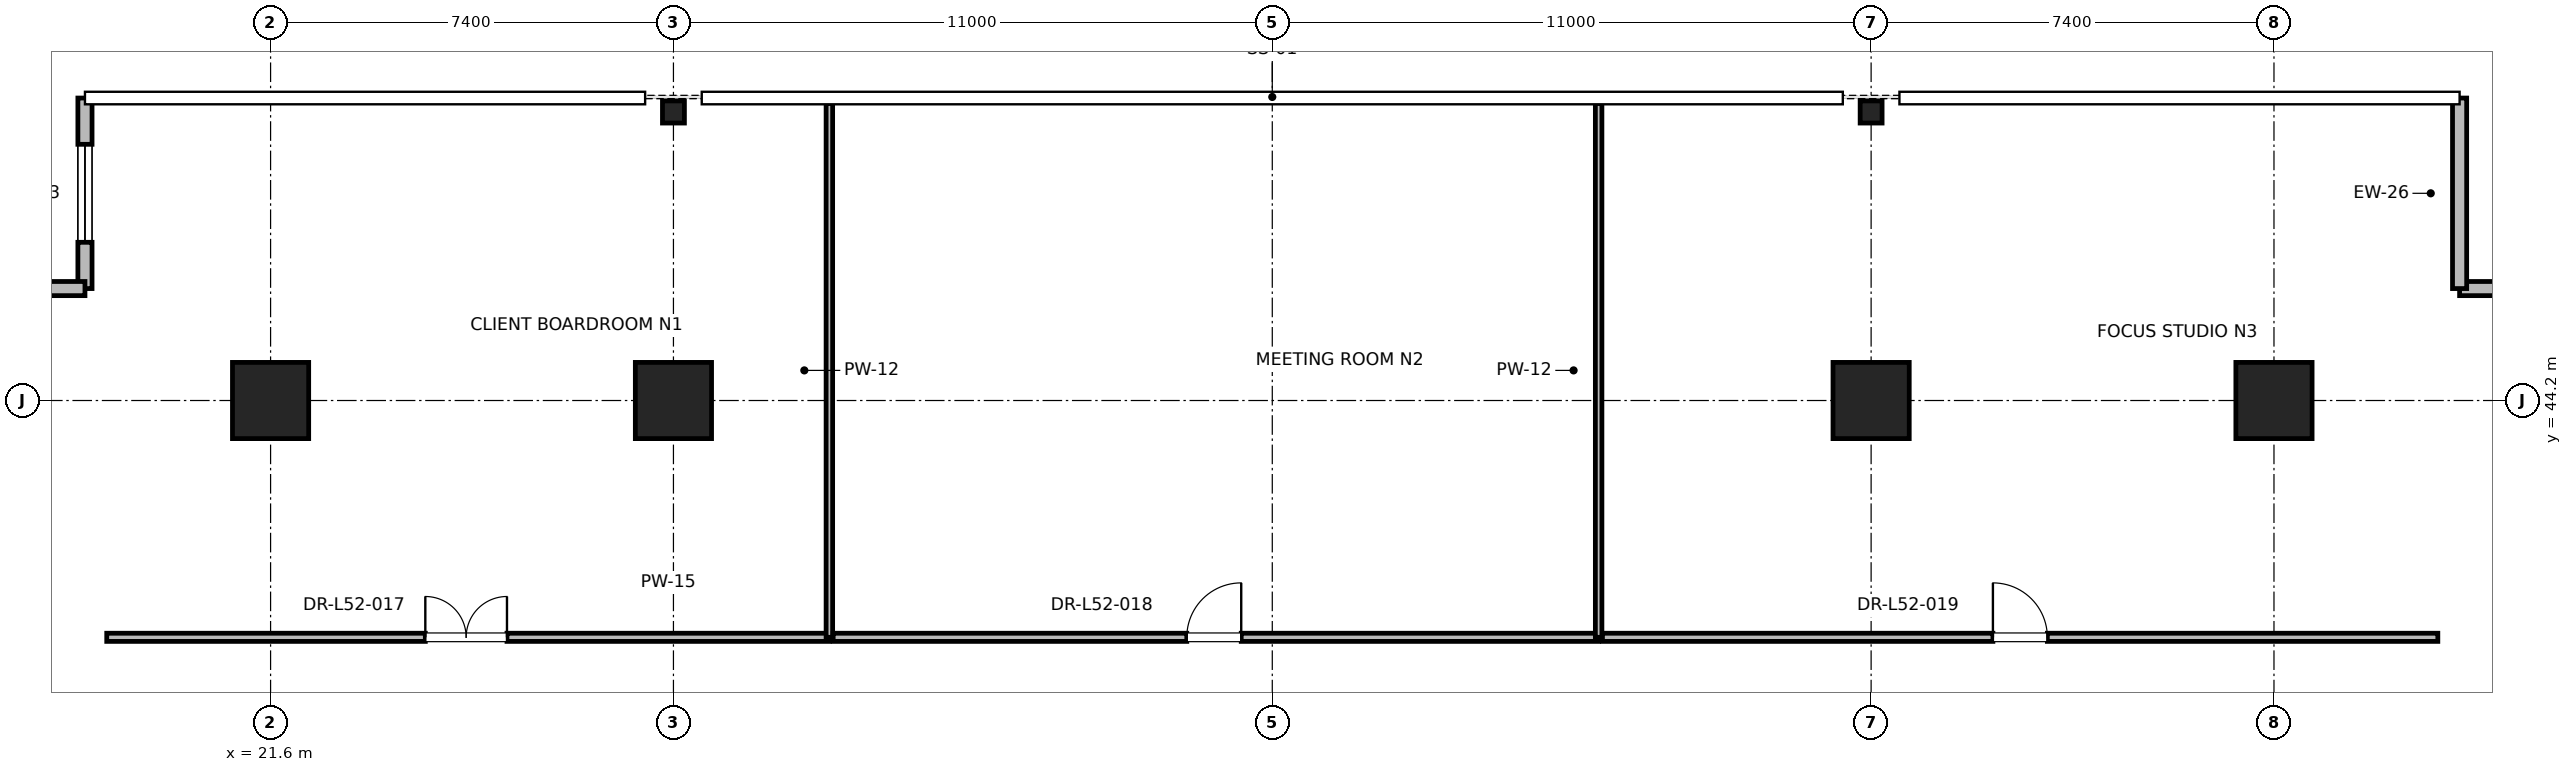
"""IFC4 building model, lengths in metres.
Left out: names, types, materials, properties, quantities, classifications, styles, units other than length and angle.
Written with IfcOpenShell. Run it as: python <this file> out.ifc"""

import sys

from ifc_helpers import new_model, si_unit, direction, frame, frame_2d, origin, origin_2d, place, context, subcontext, project, spatial, rectangle, i_section, extrude, element, fill, save


model = new_model("IFC4")
c1 = context("Model", 3, precision=1e-05, world=origin(), true_north=direction((0.0, 1.0)))
c2 = subcontext(c1, "Body", "Model", "MODEL_VIEW")
j1 = project(units=[si_unit("LENGTHUNIT", "METRE"), si_unit("PLANEANGLEUNIT", "RADIAN")], contexts=[c1])
p1 = place(None, origin())
s1 = spatial("IfcSite", under=j1, at=p1, CompositionType="ELEMENT")
p2 = place(p1, origin())
s2 = spatial("IfcBuilding", under=s1, at=p2, CompositionType="ELEMENT")
p3 = place(p2, frame((0.0, 0.0, 225.2)))
s3 = spatial("IfcBuildingStorey", under=s2, at=p3, CompositionType="ELEMENT", Elevation=225.2)
for number, where, z_axis, x_axis in (
    (1, (29.0, 44.2, 0.0), (0.0, 0.0, 1.0), (1.0, 0.0, 0.0)),
    (2, (51.0, 44.2, 0.0), (0.0, 0.0, 1.0), (1.0, 0.0, 0.0)),
    (3, (21.6, 44.2, 0.0), (0.0, 0.0, 1.0), (1.0, 0.0, 0.0)),
    (4, (58.4, 44.2, 0.0), (0.0, 0.0, 1.0), (1.0, 0.0, 0.0)),
):
    element("IfcColumn", number, at=place(p3, frame(where, z_axis=z_axis, x_axis=x_axis)), inside=s3, PredefinedType="COLUMN", context=c2, shape_type="SweptSolid", body=[
        extrude(rectangle(XDim=1.4, YDim=1.4, at=origin_2d()), origin(), (0.0, 0.0, 1.0), 4.0),
    ])
for number, where, z_axis, x_axis in (
    (5, (29.0, 49.5, 0.0), (0.0, 0.0, 1.0), (1.0, 0.0, 0.0)),
    (6, (51.0, 49.5, 0.0), (0.0, 0.0, 1.0), (1.0, 0.0, 0.0)),
):
    element("IfcColumn", number, at=place(p3, frame(where, z_axis=z_axis, x_axis=x_axis)), inside=s3, PredefinedType="COLUMN", context=c2, shape_type="SweptSolid", body=[
        extrude(i_section(OverallWidth=0.403, OverallDepth=0.406, WebThickness=0.027, FlangeThickness=0.043, FilletRadius=0.015, at=origin_2d()), origin(), (0.0, 0.0, 1.0), 4.0),
    ])
p4 = place(p3, frame((65.81, 46.256, 0.0), z_axis=(0.0, 0.0, 1.0), x_axis=(-1.0, 0.0, 0.0)))
e7 = element("IfcWall", 7, at=p4, inside=s3, PredefinedType="PARAPET", context=c2, shape_type="SweptSolid", body=[
    extrude(rectangle(XDim=4.0, YDim=0.26, at=frame_2d((2.0, 0.0))), origin(), (0.0, 0.0, 1.0), 3.775),
])
p5 = place(p4, frame((1.1, 0.0, 0.85)))
e8 = element("IfcOpeningElement", 8, at=p5, cuts=e7, PredefinedType="OPENING", context=c2, shape_type="SweptSolid", body=[
    extrude(rectangle(XDim=1.8, YDim=2.2, at=frame_2d((0.9, 1.1))), frame((0.0, 0.13, 0.0), z_axis=(0.0, -1.0, 0.0), x_axis=(1.0, 0.0, 0.0)), (0.0, 0.0, 1.0), 0.26),
])
p6 = place(p3, frame((61.81, 46.256, 0.0), z_axis=(0.0, 0.0, 1.0), x_axis=(0.0, 1.0, 0.0)))
e9 = element("IfcWall", 9, at=p6, inside=s3, PredefinedType="PARAPET", context=c2, shape_type="SweptSolid", body=[
    extrude(rectangle(XDim=3.5, YDim=0.26, at=frame_2d((1.75, 0.0))), origin(), (0.0, 0.0, 1.0), 3.775),
])
p7 = place(p3, frame((18.19, 49.756, 0.0), z_axis=(0.0, 0.0, 1.0), x_axis=(0.0, -1.0, 0.0)))
e10 = element("IfcWall", 10, at=p7, inside=s3, PredefinedType="PARAPET", context=c2, shape_type="SweptSolid", body=[
    extrude(rectangle(XDim=3.5, YDim=0.26, at=frame_2d((1.75, 0.0))), origin(), (0.0, 0.0, 1.0), 3.775),
])
p8 = place(p7, frame((0.85, 0.0, 0.85)))
e11 = element("IfcOpeningElement", 11, at=p8, cuts=e10, PredefinedType="OPENING", context=c2, shape_type="SweptSolid", body=[
    extrude(rectangle(XDim=1.8, YDim=2.2, at=frame_2d((0.9, 1.1))), frame((0.0, 0.13, 0.0), z_axis=(0.0, -1.0, 0.0), x_axis=(1.0, 0.0, 0.0)), (0.0, 0.0, 1.0), 0.26),
])
p9 = place(p3, frame((18.19, 46.256, 0.0), z_axis=(0.0, 0.0, 1.0), x_axis=(-1.0, 0.0, 0.0)))
e12 = element("IfcWall", 12, at=p9, inside=s3, PredefinedType="PARAPET", context=c2, shape_type="SweptSolid", body=[
    extrude(rectangle(XDim=4.0, YDim=0.26, at=frame_2d((2.0, 0.0))), origin(), (0.0, 0.0, 1.0), 3.775),
])
p10 = place(p3, frame((18.59, 39.85, 0.0), z_axis=(0.0, 0.0, 1.0), x_axis=(1.0, 0.0, 0.0)))
e13 = element("IfcWall", 13, at=p10, inside=s3, PredefinedType="PARTITIONING", context=c2, shape_type="SweptSolid", body=[
    extrude(rectangle(XDim=13.274, YDim=0.15, at=frame_2d((6.637, 0.0))), origin(), (0.0, 0.0, 1.0), 2.85),
])
p11 = place(p10, frame((5.852, 0.0, 0.0)))
e14 = element("IfcOpeningElement", 14, at=p11, cuts=e13, PredefinedType="OPENING", context=c2, shape_type="SweptSolid", body=[
    extrude(rectangle(XDim=1.5, YDim=2.25, at=frame_2d((0.75, 1.125))), frame((0.0, 0.075, 0.0), z_axis=(0.0, -1.0, 0.0), x_axis=(1.0, 0.0, 0.0)), (0.0, 0.0, 1.0), 0.15),
])
p12 = place(p3, frame((31.864, 39.85, 0.0), z_axis=(0.0, 0.0, 1.0), x_axis=(0.0, 1.0, 0.0)))
e15 = element("IfcWall", 15, at=p12, inside=s3, PredefinedType="PARTITIONING", context=c2, shape_type="SweptSolid", body=[
    extrude(rectangle(XDim=9.806, YDim=0.12, at=frame_2d((4.903, 0.0))), origin(), (0.0, 0.0, 1.0), 2.405),
])
p13 = place(p3, frame((31.934, 39.85, 0.0), z_axis=(0.0, 0.0, 1.0), x_axis=(1.0, 0.0, 0.0)))
e16 = element("IfcWall", 16, at=p13, inside=s3, PredefinedType="PARTITIONING", context=c2, shape_type="SweptSolid", body=[
    extrude(rectangle(XDim=14.06, YDim=0.15, at=frame_2d((7.03, 0.0))), origin(), (0.0, 0.0, 1.0), 2.85),
])
p14 = place(p13, frame((6.495, 0.0, 0.0)))
e17 = element("IfcOpeningElement", 17, at=p14, cuts=e16, PredefinedType="OPENING", context=c2, shape_type="SweptSolid", body=[
    extrude(rectangle(XDim=1.0, YDim=2.15, at=frame_2d((0.5, 1.075))), frame((0.0, 0.075, 0.0), z_axis=(0.0, -1.0, 0.0), x_axis=(1.0, 0.0, 0.0)), (0.0, 0.0, 1.0), 0.15),
])
p15 = place(p3, frame((45.995, 39.85, 0.0), z_axis=(0.0, 0.0, 1.0), x_axis=(0.0, 1.0, 0.0)))
e18 = element("IfcWall", 18, at=p15, inside=s3, PredefinedType="PARTITIONING", context=c2, shape_type="SweptSolid", body=[
    extrude(rectangle(XDim=9.806, YDim=0.12, at=frame_2d((4.903, 0.0))), origin(), (0.0, 0.0, 1.0), 2.405),
])
p16 = place(p3, frame((46.065, 39.85, 0.0), z_axis=(0.0, 0.0, 1.0), x_axis=(1.0, 0.0, 0.0)))
e19 = element("IfcWall", 19, at=p16, inside=s3, PredefinedType="PARTITIONING", context=c2, shape_type="SweptSolid", body=[
    extrude(rectangle(XDim=15.345, YDim=0.15, at=frame_2d((7.672, 0.0))), origin(), (0.0, 0.0, 1.0), 2.85),
])
p17 = place(p16, frame((7.173, 0.0, 0.0)))
e20 = element("IfcOpeningElement", 20, at=p17, cuts=e19, PredefinedType="OPENING", context=c2, shape_type="SweptSolid", body=[
    extrude(rectangle(XDim=1.0, YDim=2.15, at=frame_2d((0.5, 1.075))), frame((0.0, 0.075, 0.0), z_axis=(0.0, -1.0, 0.0), x_axis=(1.0, 0.0, 0.0)), (0.0, 0.0, 1.0), 0.15),
])
p18 = place(p8, origin())
e21 = element("IfcWindow", 21, at=p18, inside=s3, PartitioningType="SINGLE_PANEL", PredefinedType="WINDOW", context=c2, shape_type="SweptSolid", body=[
    extrude(rectangle(XDim=1.8, YDim=2.2, at=frame_2d((0.9, 1.1))), frame((0.0, 0.03, 0.0), z_axis=(0.0, -1.0, 0.0), x_axis=(1.0, 0.0, 0.0)), (0.0, 0.0, 1.0), 0.06),
])
fill(e11, e21)
p19 = place(p11, origin())
e22 = element("IfcDoor", 22, at=p19, inside=s3, OperationType="DOUBLE_DOOR_SINGLE_SWING", PredefinedType="DOOR", context=c2, shape_type="SweptSolid", body=[
    extrude(rectangle(XDim=1.5, YDim=2.25, at=frame_2d((0.75, 1.125))), frame((0.0, 0.025, 0.0), z_axis=(0.0, -1.0, 0.0), x_axis=(1.0, 0.0, 0.0)), (0.0, 0.0, 1.0), 0.05),
])
fill(e14, e22)
p20 = place(p14, origin())
e23 = element("IfcDoor", 23, at=p20, inside=s3, OperationType="SINGLE_SWING_RIGHT", PredefinedType="DOOR", context=c2, shape_type="SweptSolid", body=[
    extrude(rectangle(XDim=1.0, YDim=2.15, at=frame_2d((0.5, 1.075))), frame((0.0, 0.025, 0.0), z_axis=(0.0, -1.0, 0.0), x_axis=(1.0, 0.0, 0.0)), (0.0, 0.0, 1.0), 0.05),
])
fill(e17, e23)
p21 = place(p17, origin())
e24 = element("IfcDoor", 24, at=p21, inside=s3, OperationType="SINGLE_SWING_LEFT", PredefinedType="DOOR", context=c2, shape_type="SweptSolid", body=[
    extrude(rectangle(XDim=1.0, YDim=2.15, at=frame_2d((0.5, 1.075))), frame((0.0, 0.025, 0.0), z_axis=(0.0, -1.0, 0.0), x_axis=(1.0, 0.0, 0.0)), (0.0, 0.0, 1.0), 0.05),
])
fill(e20, e24)
save(model, sys.argv[1])
